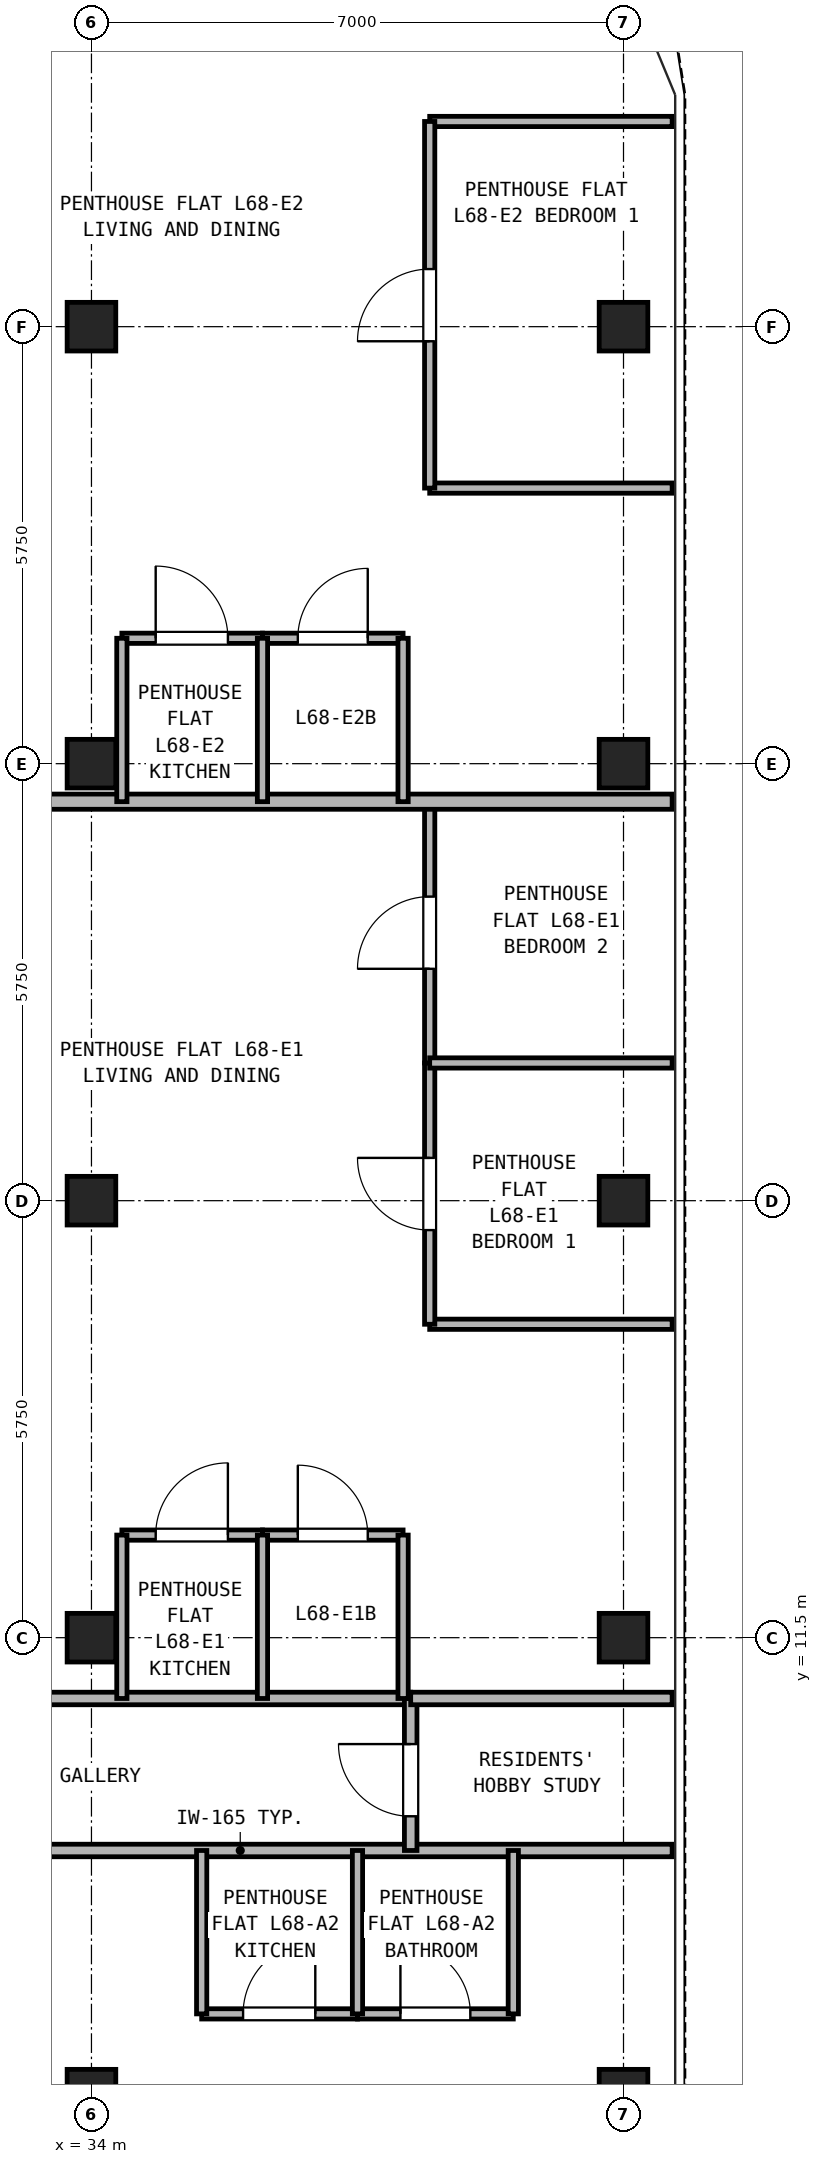
"""IFC4 building model, lengths in metres.
Left out: names, types, materials, properties, quantities, classifications, styles, units other than length and angle.
Written with IfcOpenShell. Run it as: python <this file> out.ifc"""

import sys

from ifc_helpers import new_model, si_unit, direction, frame, frame_2d, origin, origin_2d, place, context, subcontext, project, spatial, rectangle, hollow_rectangle, extrude, source, transform, mapped, element, fill, save


model = new_model("IFC4")
c1 = context("Model", 3, precision=1e-05, world=origin(), true_north=direction((0.0, 1.0)))
c2 = subcontext(c1, "Body", "Model", "MODEL_VIEW")
j1 = project(units=[si_unit("LENGTHUNIT", "METRE"), si_unit("PLANEANGLEUNIT", "RADIAN")], contexts=[c1])
p1 = place(None, origin())
s1 = spatial("IfcSite", under=j1, at=p1, CompositionType="ELEMENT")
p2 = place(p1, origin())
s2 = spatial("IfcBuilding", under=s1, at=p2, CompositionType="ELEMENT")
p3 = place(p2, frame((0.0, 0.0, 239.3)))
s3 = spatial("IfcBuildingStorey", under=s2, at=p3, CompositionType="ELEMENT", Elevation=239.3)
m1 = source(origin(), c2, "Body", "SweptSolid", [
    extrude(hollow_rectangle(XDim=0.64, YDim=0.64, WallThickness=0.035, at=origin_2d()), origin(), (0.0, 0.0, 1.0), 2.98),
])
for number, where, z_axis, x_axis in (
    (1, (41.0, 5.5, 0.0), (0.0, 0.0, 1.0), (1.0, 0.0, 0.0)),
    (2, (41.0, 11.5, 0.0), (0.0, 0.0, 1.0), (1.0, 0.0, 0.0)),
    (3, (41.0, 17.25, 0.0), (0.0, 0.0, 1.0), (1.0, 0.0, 0.0)),
    (4, (41.0, 23.0, 0.0), (0.0, 0.0, 1.0), (1.0, 0.0, 0.0)),
    (5, (41.0, 28.75, 0.0), (0.0, 0.0, 1.0), (1.0, 0.0, 0.0)),
    (6, (34.0, 5.5, 0.0), (0.0, 0.0, 1.0), (1.0, 0.0, 0.0)),
    (7, (34.0, 11.5, 0.0), (0.0, 0.0, 1.0), (1.0, 0.0, 0.0)),
    (8, (34.0, 17.25, 0.0), (0.0, 0.0, 1.0), (1.0, 0.0, 0.0)),
    (9, (34.0, 23.0, 0.0), (0.0, 0.0, 1.0), (1.0, 0.0, 0.0)),
    (10, (34.0, 28.75, 0.0), (0.0, 0.0, 1.0), (1.0, 0.0, 0.0)),
):
    element("IfcColumn", number, at=place(p3, frame(where, z_axis=z_axis, x_axis=x_axis)), inside=s3, PredefinedType="COLUMN", context=c2, shape_type="MappedRepresentation", body=[
        mapped(m1, transform((0.0, 0.0, 0.0), x_axis=(1.0, 0.0, 0.0), y_axis=(0.0, 1.0, 0.0), z_axis=(0.0, 0.0, 1.0), scale=1.0)),
    ])
p4 = place(p3, frame((5.36, 8.7, 0.0), z_axis=(0.0, 0.0, 1.0), x_axis=(1.0, 0.0, 0.0)))
e11 = element("IfcWall", 11, at=p4, inside=s3, PredefinedType="PARTITIONING", context=c2, shape_type="SweptSolid", body=[
    extrude(rectangle(XDim=36.28, YDim=0.165, at=frame_2d((18.14, 0.0))), origin(), (0.0, 0.0, 1.0), 2.655),
])
p5 = place(p4, frame((11.615, 0.0, 0.0)))
e12 = element("IfcOpeningElement", 12, at=p5, cuts=e11, PredefinedType="OPENING", context=c2, shape_type="SweptSolid", body=[
    extrude(rectangle(XDim=1.0, YDim=2.15, at=frame_2d((0.5, 1.075))), frame((0.0, 0.093, 0.0), z_axis=(0.0, -1.0, 0.0), x_axis=(1.0, 0.0, 0.0)), (0.0, 0.0, 1.0), 0.185),
])
p6 = place(p4, frame((23.665, 0.0, 0.0)))
e13 = element("IfcOpeningElement", 13, at=p6, cuts=e11, PredefinedType="OPENING", context=c2, shape_type="SweptSolid", body=[
    extrude(rectangle(XDim=1.0, YDim=2.15, at=frame_2d((0.5, 1.075))), frame((0.0, 0.093, 0.0), z_axis=(0.0, -1.0, 0.0), x_axis=(1.0, 0.0, 0.0)), (0.0, 0.0, 1.0), 0.185),
])
p7 = place(p3, frame((31.6, 10.7, 0.0), z_axis=(0.0, 0.0, 1.0), x_axis=(1.0, 0.0, 0.0)))
e14 = element("IfcWall", 14, at=p7, inside=s3, PredefinedType="PARTITIONING", context=c2, shape_type="SweptSolid", body=[
    extrude(rectangle(XDim=6.6, YDim=0.165, at=frame_2d((3.3, 0.0))), origin(), (0.0, 0.0, 1.0), 2.98),
])
p8 = place(p3, frame((38.2, 8.7, 0.0), z_axis=(0.0, 0.0, 1.0), x_axis=(0.0, 1.0, 0.0)))
e15 = element("IfcWall", 15, at=p8, inside=s3, PredefinedType="PARTITIONING", context=c2, shape_type="SweptSolid", body=[
    extrude(rectangle(XDim=2.0, YDim=0.165, at=frame_2d((1.0, 0.0))), origin(), (0.0, 0.0, 1.0), 2.98),
])
p9 = place(p8, frame((0.45, 0.0, 0.0)))
e16 = element("IfcOpeningElement", 16, at=p9, cuts=e15, PredefinedType="OPENING", context=c2, shape_type="SweptSolid", body=[
    extrude(rectangle(XDim=0.95, YDim=2.15, at=frame_2d((0.475, 1.075))), frame((0.0, 0.093, 0.0), z_axis=(0.0, -1.0, 0.0), x_axis=(1.0, 0.0, 0.0)), (0.0, 0.0, 1.0), 0.185),
])
p10 = place(p3, frame((35.45, 6.55, 0.0), z_axis=(0.0, 0.0, 1.0), x_axis=(1.0, 0.0, 0.0)))
e17 = element("IfcWall", 17, at=p10, inside=s3, PredefinedType="PARTITIONING", context=c2, shape_type="SweptSolid", body=[
    extrude(rectangle(XDim=2.05, YDim=0.135, at=frame_2d((1.025, 0.0))), origin(), (0.0, 0.0, 1.0), 2.98),
])
p11 = place(p10, frame((0.545, 0.0, 0.0)))
e18 = element("IfcOpeningElement", 18, at=p11, cuts=e17, PredefinedType="OPENING", context=c2, shape_type="SweptSolid", body=[
    extrude(rectangle(XDim=0.95, YDim=2.15, at=frame_2d((0.475, 1.075))), frame((0.0, 0.077, 0.0), z_axis=(0.0, -1.0, 0.0), x_axis=(1.0, 0.0, 0.0)), (0.0, 0.0, 1.0), 0.155),
])
p12 = place(p3, frame((37.5, 6.55, 0.0), z_axis=(0.0, 0.0, 1.0), x_axis=(1.0, 0.0, 0.0)))
e19 = element("IfcWall", 19, at=p12, inside=s3, PredefinedType="PARTITIONING", context=c2, shape_type="SweptSolid", body=[
    extrude(rectangle(XDim=2.05, YDim=0.135, at=frame_2d((1.025, 0.0))), origin(), (0.0, 0.0, 1.0), 2.98),
])
p13 = place(p12, frame((0.565, 0.0, 0.0)))
e20 = element("IfcOpeningElement", 20, at=p13, cuts=e19, PredefinedType="OPENING", context=c2, shape_type="SweptSolid", body=[
    extrude(rectangle(XDim=0.92, YDim=2.1, at=frame_2d((0.46, 1.05))), frame((0.0, 0.077, 0.0), z_axis=(0.0, -1.0, 0.0), x_axis=(1.0, 0.0, 0.0)), (0.0, 0.0, 1.0), 0.155),
])
for number, where, z_axis, x_axis in (
    (21, (35.45, 6.55, 0.0), (0.0, 0.0, 1.0), (0.0, 1.0, 0.0)),
    (22, (37.5, 6.55, 0.0), (0.0, 0.0, 1.0), (0.0, 1.0, 0.0)),
    (23, (39.55, 6.55, 0.0), (0.0, 0.0, 1.0), (0.0, 1.0, 0.0)),
):
    element("IfcWall", number, at=place(p3, frame(where, z_axis=z_axis, x_axis=x_axis)), inside=s3, PredefinedType="PARTITIONING", context=c2, shape_type="SweptSolid", body=[
        extrude(rectangle(XDim=2.15, YDim=0.135, at=frame_2d((1.075, 0.0))), origin(), (0.0, 0.0, 1.0), 2.98),
    ])
p14 = place(p3, frame((38.2, 10.7, 0.0), z_axis=(0.0, 0.0, 1.0), x_axis=(1.0, 0.0, 0.0)))
e24 = element("IfcWall", 24, at=p14, inside=s3, PredefinedType="PARTITIONING", context=c2, shape_type="SweptSolid", body=[
    extrude(rectangle(XDim=3.44, YDim=0.165, at=frame_2d((1.72, 0.0))), origin(), (0.0, 0.0, 1.0), 2.98),
])
p15 = place(p3, frame((34.4, 12.85, 0.0), z_axis=(0.0, 0.0, 1.0), x_axis=(1.0, 0.0, 0.0)))
e25 = element("IfcWall", 25, at=p15, inside=s3, PredefinedType="PARTITIONING", context=c2, shape_type="SweptSolid", body=[
    extrude(rectangle(XDim=1.85, YDim=0.135, at=frame_2d((0.925, 0.0))), origin(), (0.0, 0.0, 1.0), 2.98),
])
p16 = place(p15, frame((0.445, 0.0, 0.0)))
e26 = element("IfcOpeningElement", 26, at=p16, cuts=e25, PredefinedType="OPENING", context=c2, shape_type="SweptSolid", body=[
    extrude(rectangle(XDim=0.95, YDim=2.15, at=frame_2d((0.475, 1.075))), frame((0.0, 0.077, 0.0), z_axis=(0.0, -1.0, 0.0), x_axis=(1.0, 0.0, 0.0)), (0.0, 0.0, 1.0), 0.155),
])
p17 = place(p3, frame((36.25, 12.85, 0.0), z_axis=(0.0, 0.0, 1.0), x_axis=(1.0, 0.0, 0.0)))
e27 = element("IfcWall", 27, at=p17, inside=s3, PredefinedType="PARTITIONING", context=c2, shape_type="SweptSolid", body=[
    extrude(rectangle(XDim=1.85, YDim=0.135, at=frame_2d((0.925, 0.0))), origin(), (0.0, 0.0, 1.0), 2.98),
])
p18 = place(p17, frame((0.465, 0.0, 0.0)))
e28 = element("IfcOpeningElement", 28, at=p18, cuts=e27, PredefinedType="OPENING", context=c2, shape_type="SweptSolid", body=[
    extrude(rectangle(XDim=0.92, YDim=2.1, at=frame_2d((0.46, 1.05))), frame((0.0, 0.077, 0.0), z_axis=(0.0, -1.0, 0.0), x_axis=(1.0, 0.0, 0.0)), (0.0, 0.0, 1.0), 0.155),
])
for number, where, z_axis, x_axis in (
    (29, (34.4, 10.7, 0.0), (0.0, 0.0, 1.0), (0.0, 1.0, 0.0)),
    (30, (36.25, 10.7, 0.0), (0.0, 0.0, 1.0), (0.0, 1.0, 0.0)),
    (31, (38.1, 10.7, 0.0), (0.0, 0.0, 1.0), (0.0, 1.0, 0.0)),
):
    element("IfcWall", number, at=place(p3, frame(where, z_axis=z_axis, x_axis=x_axis)), inside=s3, PredefinedType="PARTITIONING", context=c2, shape_type="SweptSolid", body=[
        extrude(rectangle(XDim=2.15, YDim=0.135, at=frame_2d((1.075, 0.0))), origin(), (0.0, 0.0, 1.0), 2.98),
    ])
p19 = place(p3, frame((38.45, 15.624, 0.0), z_axis=(0.0, 0.0, 1.0), x_axis=(1.0, 0.0, 0.0)))
e32 = element("IfcWall", 32, at=p19, inside=s3, PredefinedType="PARTITIONING", context=c2, shape_type="SweptSolid", body=[
    extrude(rectangle(XDim=3.19, YDim=0.135, at=frame_2d((1.595, 0.0))), origin(), (0.0, 0.0, 1.0), 2.98),
])
p20 = place(p3, frame((38.45, 15.624, 0.0), z_axis=(0.0, 0.0, 1.0), x_axis=(0.0, 1.0, 0.0)))
e33 = element("IfcWall", 33, at=p20, inside=s3, PredefinedType="PARTITIONING", context=c2, shape_type="SweptSolid", body=[
    extrude(rectangle(XDim=3.438, YDim=0.135, at=frame_2d((1.719, 0.0))), origin(), (0.0, 0.0, 1.0), 2.98),
])
p21 = place(p20, frame((1.239, 0.0, 0.0)))
e34 = element("IfcOpeningElement", 34, at=p21, cuts=e33, PredefinedType="OPENING", context=c2, shape_type="SweptSolid", body=[
    extrude(rectangle(XDim=0.95, YDim=2.15, at=frame_2d((0.475, 1.075))), frame((0.0, 0.077, 0.0), z_axis=(0.0, -1.0, 0.0), x_axis=(1.0, 0.0, 0.0)), (0.0, 0.0, 1.0), 0.155),
])
p22 = place(p3, frame((38.45, 19.062, 0.0), z_axis=(0.0, 0.0, 1.0), x_axis=(0.0, 1.0, 0.0)))
e35 = element("IfcWall", 35, at=p22, inside=s3, PredefinedType="PARTITIONING", context=c2, shape_type="SweptSolid", body=[
    extrude(rectangle(XDim=3.438, YDim=0.135, at=frame_2d((1.719, 0.0))), origin(), (0.0, 0.0, 1.0), 2.98),
])
p23 = place(p22, frame((1.239, 0.0, 0.0)))
e36 = element("IfcOpeningElement", 36, at=p23, cuts=e35, PredefinedType="OPENING", context=c2, shape_type="SweptSolid", body=[
    extrude(rectangle(XDim=0.95, YDim=2.15, at=frame_2d((0.475, 1.075))), frame((0.0, 0.077, 0.0), z_axis=(0.0, -1.0, 0.0), x_axis=(1.0, 0.0, 0.0)), (0.0, 0.0, 1.0), 0.155),
])
p24 = place(p3, frame((38.45, 19.062, 0.0), z_axis=(0.0, 0.0, 1.0), x_axis=(1.0, 0.0, 0.0)))
e37 = element("IfcWall", 37, at=p24, inside=s3, PredefinedType="PARTITIONING", context=c2, shape_type="SweptSolid", body=[
    extrude(rectangle(XDim=3.19, YDim=0.135, at=frame_2d((1.595, 0.0))), origin(), (0.0, 0.0, 1.0), 2.98),
])
p25 = place(p3, frame((31.6, 22.5, 0.0), z_axis=(0.0, 0.0, 1.0), x_axis=(1.0, 0.0, 0.0)))
e38 = element("IfcWall", 38, at=p25, inside=s3, PredefinedType="PARTITIONING", context=c2, shape_type="SweptSolid", body=[
    extrude(rectangle(XDim=10.04, YDim=0.2, at=frame_2d((5.02, 0.0))), origin(), (0.0, 0.0, 1.0), 2.98),
])
p26 = place(p3, frame((34.4, 24.65, 0.0), z_axis=(0.0, 0.0, 1.0), x_axis=(1.0, 0.0, 0.0)))
e39 = element("IfcWall", 39, at=p26, inside=s3, PredefinedType="PARTITIONING", context=c2, shape_type="SweptSolid", body=[
    extrude(rectangle(XDim=1.85, YDim=0.135, at=frame_2d((0.925, 0.0))), origin(), (0.0, 0.0, 1.0), 2.98),
])
p27 = place(p26, frame((0.445, 0.0, 0.0)))
e40 = element("IfcOpeningElement", 40, at=p27, cuts=e39, PredefinedType="OPENING", context=c2, shape_type="SweptSolid", body=[
    extrude(rectangle(XDim=0.95, YDim=2.15, at=frame_2d((0.475, 1.075))), frame((0.0, 0.077, 0.0), z_axis=(0.0, -1.0, 0.0), x_axis=(1.0, 0.0, 0.0)), (0.0, 0.0, 1.0), 0.155),
])
p28 = place(p3, frame((36.25, 24.65, 0.0), z_axis=(0.0, 0.0, 1.0), x_axis=(1.0, 0.0, 0.0)))
e41 = element("IfcWall", 41, at=p28, inside=s3, PredefinedType="PARTITIONING", context=c2, shape_type="SweptSolid", body=[
    extrude(rectangle(XDim=1.85, YDim=0.135, at=frame_2d((0.925, 0.0))), origin(), (0.0, 0.0, 1.0), 2.98),
])
p29 = place(p28, frame((0.465, 0.0, 0.0)))
e42 = element("IfcOpeningElement", 42, at=p29, cuts=e41, PredefinedType="OPENING", context=c2, shape_type="SweptSolid", body=[
    extrude(rectangle(XDim=0.92, YDim=2.1, at=frame_2d((0.46, 1.05))), frame((0.0, 0.077, 0.0), z_axis=(0.0, -1.0, 0.0), x_axis=(1.0, 0.0, 0.0)), (0.0, 0.0, 1.0), 0.155),
])
for number, where, z_axis, x_axis in (
    (43, (34.4, 22.5, 0.0), (0.0, 0.0, 1.0), (0.0, 1.0, 0.0)),
    (44, (36.25, 22.5, 0.0), (0.0, 0.0, 1.0), (0.0, 1.0, 0.0)),
    (45, (38.1, 22.5, 0.0), (0.0, 0.0, 1.0), (0.0, 1.0, 0.0)),
):
    element("IfcWall", number, at=place(p3, frame(where, z_axis=z_axis, x_axis=x_axis)), inside=s3, PredefinedType="PARTITIONING", context=c2, shape_type="SweptSolid", body=[
        extrude(rectangle(XDim=2.15, YDim=0.135, at=frame_2d((1.075, 0.0))), origin(), (0.0, 0.0, 1.0), 2.98),
    ])
for number, where, z_axis, x_axis in (
    (46, (38.45, 26.626, 0.0), (0.0, 0.0, 1.0), (1.0, 0.0, 0.0)),
    (47, (38.45, 31.45, 0.0), (0.0, 0.0, 1.0), (1.0, 0.0, 0.0)),
):
    element("IfcWall", number, at=place(p3, frame(where, z_axis=z_axis, x_axis=x_axis)), inside=s3, PredefinedType="PARTITIONING", context=c2, shape_type="SweptSolid", body=[
        extrude(rectangle(XDim=3.19, YDim=0.135, at=frame_2d((1.595, 0.0))), origin(), (0.0, 0.0, 1.0), 2.98),
    ])
p30 = place(p3, frame((38.45, 26.626, 0.0), z_axis=(0.0, 0.0, 1.0), x_axis=(0.0, 1.0, 0.0)))
e48 = element("IfcWall", 48, at=p30, inside=s3, PredefinedType="PARTITIONING", context=c2, shape_type="SweptSolid", body=[
    extrude(rectangle(XDim=4.824, YDim=0.135, at=frame_2d((2.412, 0.0))), origin(), (0.0, 0.0, 1.0), 2.98),
])
p31 = place(p30, frame((1.932, 0.0, 0.0)))
e49 = element("IfcOpeningElement", 49, at=p31, cuts=e48, PredefinedType="OPENING", context=c2, shape_type="SweptSolid", body=[
    extrude(rectangle(XDim=0.95, YDim=2.15, at=frame_2d((0.475, 1.075))), frame((0.0, 0.077, 0.0), z_axis=(0.0, -1.0, 0.0), x_axis=(1.0, 0.0, 0.0)), (0.0, 0.0, 1.0), 0.155),
])
p32 = place(p11, origin())
e50 = element("IfcDoor", 50, at=p32, inside=s3, OperationType="SINGLE_SWING_RIGHT", PredefinedType="DOOR", context=c2, shape_type="SweptSolid", body=[
    extrude(rectangle(XDim=0.95, YDim=2.15, at=frame_2d((0.475, 1.075))), frame((0.0, 0.025, 0.0), z_axis=(0.0, -1.0, 0.0), x_axis=(1.0, 0.0, 0.0)), (0.0, 0.0, 1.0), 0.05),
])
fill(e18, e50)
p33 = place(p13, origin())
e51 = element("IfcDoor", 51, at=p33, inside=s3, OperationType="SINGLE_SWING_LEFT", PredefinedType="DOOR", context=c2, shape_type="SweptSolid", body=[
    extrude(rectangle(XDim=0.92, YDim=2.1, at=frame_2d((0.46, 1.05))), frame((0.0, 0.025, 0.0), z_axis=(0.0, -1.0, 0.0), x_axis=(1.0, 0.0, 0.0)), (0.0, 0.0, 1.0), 0.05),
])
fill(e20, e51)
p34 = place(p9, origin())
e52 = element("IfcDoor", 52, at=p34, inside=s3, OperationType="SINGLE_SWING_RIGHT", PredefinedType="DOOR", context=c2, shape_type="SweptSolid", body=[
    extrude(rectangle(XDim=0.95, YDim=2.15, at=frame_2d((0.475, 1.075))), frame((0.0, 0.025, 0.0), z_axis=(0.0, -1.0, 0.0), x_axis=(1.0, 0.0, 0.0)), (0.0, 0.0, 1.0), 0.05),
])
fill(e16, e52)
p35 = place(p16, origin())
e53 = element("IfcDoor", 53, at=p35, inside=s3, OperationType="SINGLE_SWING_RIGHT", PredefinedType="DOOR", context=c2, shape_type="SweptSolid", body=[
    extrude(rectangle(XDim=0.95, YDim=2.15, at=frame_2d((0.475, 1.075))), frame((0.0, 0.025, 0.0), z_axis=(0.0, -1.0, 0.0), x_axis=(1.0, 0.0, 0.0)), (0.0, 0.0, 1.0), 0.05),
])
fill(e26, e53)
p36 = place(p18, origin())
e54 = element("IfcDoor", 54, at=p36, inside=s3, OperationType="SINGLE_SWING_LEFT", PredefinedType="DOOR", context=c2, shape_type="SweptSolid", body=[
    extrude(rectangle(XDim=0.92, YDim=2.1, at=frame_2d((0.46, 1.05))), frame((0.0, 0.025, 0.0), z_axis=(0.0, -1.0, 0.0), x_axis=(1.0, 0.0, 0.0)), (0.0, 0.0, 1.0), 0.05),
])
fill(e28, e54)
p37 = place(p21, frame((0.95, 0.0, 0.0), z_axis=(0.0, 0.0, 1.0), x_axis=(-1.0, 0.0, 0.0)))
e55 = element("IfcDoor", 55, at=p37, inside=s3, OperationType="SINGLE_SWING_RIGHT", PredefinedType="DOOR", context=c2, shape_type="SweptSolid", body=[
    extrude(rectangle(XDim=0.95, YDim=2.15, at=frame_2d((0.475, 1.075))), frame((0.0, 0.025, 0.0), z_axis=(0.0, -1.0, 0.0), x_axis=(1.0, 0.0, 0.0)), (0.0, 0.0, 1.0), 0.05),
])
fill(e34, e55)
p38 = place(p23, frame((0.95, 0.0, 0.0), z_axis=(0.0, 0.0, 1.0), x_axis=(-1.0, 0.0, 0.0)))
e56 = element("IfcDoor", 56, at=p38, inside=s3, OperationType="SINGLE_SWING_LEFT", PredefinedType="DOOR", context=c2, shape_type="SweptSolid", body=[
    extrude(rectangle(XDim=0.95, YDim=2.15, at=frame_2d((0.475, 1.075))), frame((0.0, 0.025, 0.0), z_axis=(0.0, -1.0, 0.0), x_axis=(1.0, 0.0, 0.0)), (0.0, 0.0, 1.0), 0.05),
])
fill(e36, e56)
p39 = place(p27, origin())
e57 = element("IfcDoor", 57, at=p39, inside=s3, OperationType="SINGLE_SWING_LEFT", PredefinedType="DOOR", context=c2, shape_type="SweptSolid", body=[
    extrude(rectangle(XDim=0.95, YDim=2.15, at=frame_2d((0.475, 1.075))), frame((0.0, 0.025, 0.0), z_axis=(0.0, -1.0, 0.0), x_axis=(1.0, 0.0, 0.0)), (0.0, 0.0, 1.0), 0.05),
])
fill(e40, e57)
p40 = place(p29, origin())
e58 = element("IfcDoor", 58, at=p40, inside=s3, OperationType="SINGLE_SWING_RIGHT", PredefinedType="DOOR", context=c2, shape_type="SweptSolid", body=[
    extrude(rectangle(XDim=0.92, YDim=2.1, at=frame_2d((0.46, 1.05))), frame((0.0, 0.025, 0.0), z_axis=(0.0, -1.0, 0.0), x_axis=(1.0, 0.0, 0.0)), (0.0, 0.0, 1.0), 0.05),
])
fill(e42, e58)
p41 = place(p31, frame((0.95, 0.0, 0.0), z_axis=(0.0, 0.0, 1.0), x_axis=(-1.0, 0.0, 0.0)))
e59 = element("IfcDoor", 59, at=p41, inside=s3, OperationType="SINGLE_SWING_LEFT", PredefinedType="DOOR", context=c2, shape_type="SweptSolid", body=[
    extrude(rectangle(XDim=0.95, YDim=2.15, at=frame_2d((0.475, 1.075))), frame((0.0, 0.025, 0.0), z_axis=(0.0, -1.0, 0.0), x_axis=(1.0, 0.0, 0.0)), (0.0, 0.0, 1.0), 0.05),
])
fill(e49, e59)
save(model, sys.argv[1])
